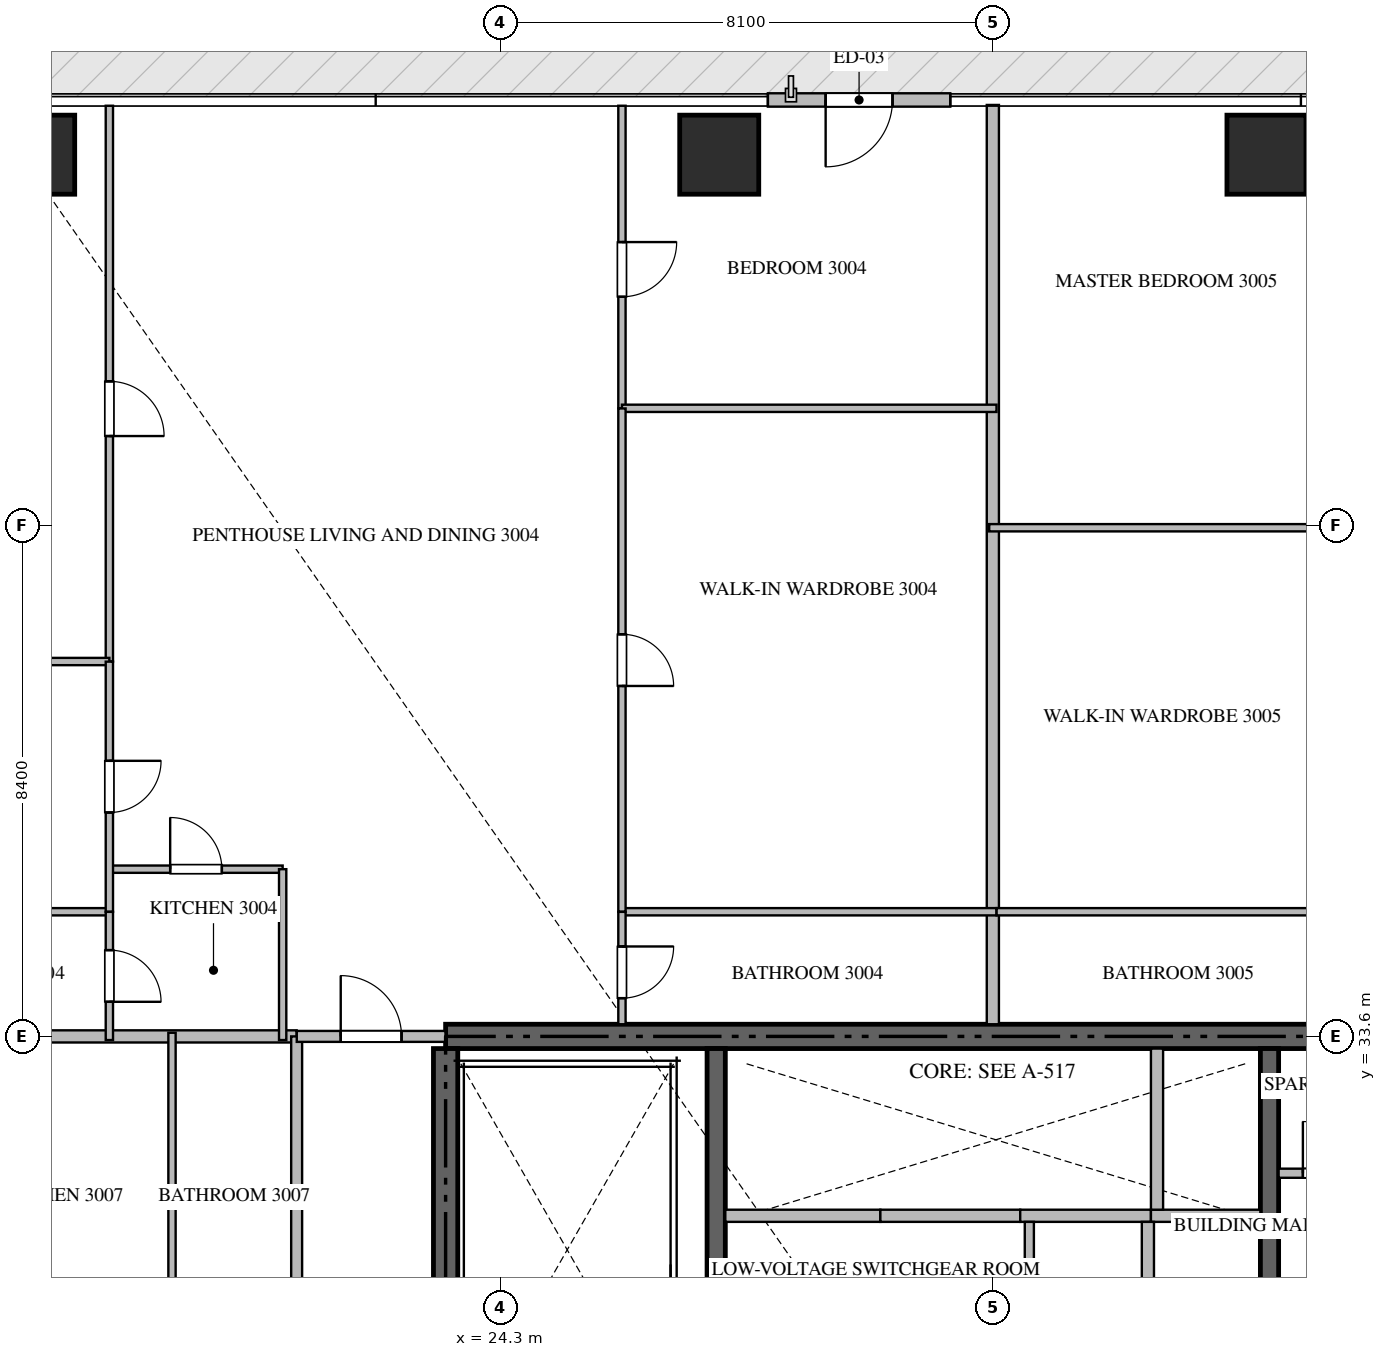
"""IFC4 building model, lengths in metres.
Left out: names, types, materials, properties, quantities, classifications, styles, units other than length and angle.
Written with IfcOpenShell. Run it as: python <this file> out.ifc"""

import sys

from ifc_helpers import new_model, si_unit, direction, frame, frame_2d, origin, origin_2d, place, context, subcontext, project, spatial, rectangle, extrude, source, transform, mapped, element, fill, save


model = new_model("IFC4")
c1 = context("Model", 3, precision=1e-05, world=origin(), true_north=direction((0.0, 1.0)))
c2 = subcontext(c1, "Body", "Model", "MODEL_VIEW")
j1 = project(units=[si_unit("LENGTHUNIT", "METRE"), si_unit("PLANEANGLEUNIT", "RADIAN")], contexts=[c1])
p1 = place(None, origin())
s1 = spatial("IfcSite", under=j1, at=p1, CompositionType="ELEMENT")
p2 = place(p1, origin())
s2 = spatial("IfcBuilding", under=s1, at=p2, CompositionType="ELEMENT")
p3 = place(p2, frame((0.0, 0.0, 123.9)))
s3 = spatial("IfcBuildingStorey", under=s2, at=p3, CompositionType="ELEMENT", Elevation=123.9)
p4 = place(p3, frame((41.4, 33.6, -0.26), z_axis=(0.0, 0.0, 1.0), x_axis=(-1.0, 0.0, 0.0)))
e1 = element("IfcWall", 1, at=p4, inside=s3, PredefinedType="SHEAR", context=c2, shape_type="SweptSolid", body=[
    extrude(rectangle(XDim=18.0, YDim=0.4, at=frame_2d((9.0, 0.0))), origin(), (0.0, 0.0, 1.0), 3.748),
])
p5 = place(p3, frame((23.4, 24.25, -0.26), z_axis=(0.0, 0.0, 1.0), x_axis=(0.0, 1.0, 0.0)))
e2 = element("IfcWall", 2, at=p5, inside=s3, PredefinedType="SHEAR", context=c2, shape_type="SweptSolid", body=[
    extrude(rectangle(XDim=9.15, YDim=0.4, at=frame_2d((4.575, 0.0))), origin(), (0.0, 0.0, 1.0), 3.748),
])
p6 = place(p3, frame((27.85, 23.55, -0.26), z_axis=(0.0, 0.0, 1.0), x_axis=(0.0, 1.0, 0.0)))
e3 = element("IfcWall", 3, at=p6, inside=s3, PredefinedType="SHEAR", context=c2, shape_type="SweptSolid", body=[
    extrude(rectangle(XDim=9.85, YDim=0.3, at=frame_2d((4.925, 0.0))), origin(), (0.0, 0.0, 1.0), 3.748),
])
p7 = place(p3, frame((36.95, 27.05, -0.26), z_axis=(0.0, 0.0, 1.0), x_axis=(0.0, 1.0, 0.0)))
e4 = element("IfcWall", 4, at=p7, inside=s3, PredefinedType="SHEAR", context=c2, shape_type="SweptSolid", body=[
    extrude(rectangle(XDim=6.35, YDim=0.3, at=frame_2d((3.175, 0.0))), origin(), (0.0, 0.0, 1.0), 3.748),
])
m1 = source(origin(), c2, "Body", "SweptSolid", [
    extrude(rectangle(XDim=1.3, YDim=1.3, at=origin_2d()), origin(), (0.0, 0.0, 1.0), 3.75),
])
for number, where, z_axis, x_axis in (
    (5, (16.65, 48.1, -0.26), (0.0, 0.0, 1.0), (1.0, 0.0, 0.0)),
    (6, (27.9, 48.1, -0.26), (0.0, 0.0, 1.0), (1.0, 0.0, 0.0)),
    (7, (36.9, 48.1, -0.26), (0.0, 0.0, 1.0), (1.0, 0.0, 0.0)),
):
    element("IfcColumn", number, at=place(p3, frame(where, z_axis=z_axis, x_axis=x_axis)), inside=s3, PredefinedType="COLUMN", context=c2, shape_type="MappedRepresentation", body=[
        mapped(m1, transform((0.0, 0.0, 0.0), scale=1.0)),
    ])
p8 = place(p3, frame((31.7, 49.0, 0.0), z_axis=(0.0, 0.0, 1.0), x_axis=(-1.0, 0.0, 0.0)))
e8 = element("IfcWall", 8, at=p8, inside=s3, PredefinedType="ELEMENTEDWALL", context=c2, shape_type="SweptSolid", body=[
    extrude(rectangle(XDim=3.0, YDim=0.22, at=frame_2d((1.5, 0.0))), origin(), (0.0, 0.0, 1.0), 3.475),
])
p9 = place(p8, frame((0.95, 0.0, 0.0)))
e9 = element("IfcOpeningElement", 9, at=p9, cuts=e8, PredefinedType="OPENING", context=c2, shape_type="SweptSolid", body=[
    extrude(rectangle(XDim=1.1, YDim=2.2, at=frame_2d((0.55, 1.1))), frame((0.0, 0.12, 0.0), z_axis=(0.0, -1.0, 0.0), x_axis=(1.0, 0.0, 0.0)), (0.0, 0.0, 1.0), 0.24),
])
p10 = place(p3, frame((28.0, 30.65, 0.0), z_axis=(0.0, 0.0, 1.0), x_axis=(1.0, 0.0, 0.0)))
e10 = element("IfcWall", 10, at=p10, inside=s3, PredefinedType="STANDARD", context=c2, shape_type="SweptSolid", body=[
    extrude(rectangle(XDim=2.55, YDim=0.2, at=frame_2d((1.275, 0.0))), origin(), (0.0, 0.0, 1.0), 3.49),
])
p11 = place(p3, frame((30.55, 30.65, 0.0), z_axis=(0.0, 0.0, 1.0), x_axis=(1.0, 0.0, 0.0)))
e11 = element("IfcWall", 11, at=p11, inside=s3, PredefinedType="STANDARD", context=c2, shape_type="SweptSolid", body=[
    extrude(rectangle(XDim=2.3, YDim=0.2, at=frame_2d((1.15, 0.0))), origin(), (0.0, 0.0, 1.0), 3.49),
])
p12 = place(p3, frame((32.85, 30.65, 0.0), z_axis=(0.0, 0.0, 1.0), x_axis=(1.0, 0.0, 0.0)))
e12 = element("IfcWall", 12, at=p12, inside=s3, PredefinedType="STANDARD", context=c2, shape_type="SweptSolid", body=[
    extrude(rectangle(XDim=2.15, YDim=0.2, at=frame_2d((1.075, 0.0))), origin(), (0.0, 0.0, 1.0), 3.49),
])
p13 = place(p3, frame((35.0, 30.65, 0.0), z_axis=(0.0, 0.0, 1.0), x_axis=(1.0, 0.0, 0.0)))
e13 = element("IfcWall", 13, at=p13, inside=s3, PredefinedType="STANDARD", context=c2, shape_type="SweptSolid", body=[
    extrude(rectangle(XDim=1.8, YDim=0.2, at=frame_2d((0.9, 0.0))), origin(), (0.0, 0.0, 1.0), 3.49),
])
p14 = place(p3, frame((35.1, 30.75, 0.0), z_axis=(0.0, 0.0, 1.0), x_axis=(0.0, 1.0, 0.0)))
e14 = element("IfcWall", 14, at=p14, inside=s3, PredefinedType="STANDARD", context=c2, shape_type="SweptSolid", body=[
    extrude(rectangle(XDim=2.65, YDim=0.2, at=frame_2d((1.325, 0.0))), origin(), (0.0, 0.0, 1.0), 3.49),
])
p15 = place(p3, frame((37.1, 31.35, 0.0), z_axis=(0.0, 0.0, 1.0), x_axis=(1.0, 0.0, 0.0)))
e15 = element("IfcWall", 15, at=p15, inside=s3, PredefinedType="PARTITIONING", context=c2, shape_type="SweptSolid", body=[
    extrude(rectangle(XDim=1.648, YDim=0.15, at=frame_2d((0.824, 0.0))), origin(), (0.0, 0.0, 1.0), 3.49),
])
p16 = place(p15, frame((0.399, 0.0, 0.0)))
e16 = element("IfcOpeningElement", 16, at=p16, cuts=e15, PredefinedType="OPENING", context=c2, shape_type="SweptSolid", body=[
    extrude(rectangle(XDim=0.85, YDim=2.1, at=frame_2d((0.425, 1.05))), frame((0.0, 0.085, 0.0), z_axis=(0.0, -1.0, 0.0), x_axis=(1.0, 0.0, 0.0)), (0.0, 0.0, 1.0), 0.17),
])
p17 = place(p3, frame((34.95, 26.95, 0.0), z_axis=(0.0, 0.0, 1.0), x_axis=(0.0, 1.0, 0.0)))
e17 = element("IfcWall", 17, at=p17, inside=s3, PredefinedType="STANDARD", context=c2, shape_type="SweptSolid", body=[
    extrude(rectangle(XDim=3.6, YDim=0.2, at=frame_2d((1.8, 0.0))), origin(), (0.0, 0.0, 1.0), 3.49),
])
p18 = place(p17, frame((1.35, 0.0, 0.0)))
e18 = element("IfcOpeningElement", 18, at=p18, cuts=e17, PredefinedType="OPENING", context=c2, shape_type="SweptSolid", body=[
    extrude(rectangle(XDim=0.9, YDim=2.1, at=frame_2d((0.45, 1.05))), frame((0.0, 0.11, 0.0), z_axis=(0.0, -1.0, 0.0), x_axis=(1.0, 0.0, 0.0)), (0.0, 0.0, 1.0), 0.22),
])
p19 = place(p3, frame((33.0, 26.95, 0.0), z_axis=(0.0, 0.0, 1.0), x_axis=(0.0, 1.0, 0.0)))
e19 = element("IfcWall", 19, at=p19, inside=s3, PredefinedType="PARTITIONING", context=c2, shape_type="SweptSolid", body=[
    extrude(rectangle(XDim=3.6, YDim=0.15, at=frame_2d((1.8, 0.0))), origin(), (0.0, 0.0, 1.0), 3.49),
])
p20 = place(p19, frame((1.375, 0.0, 0.0)))
e20 = element("IfcOpeningElement", 20, at=p20, cuts=e19, PredefinedType="OPENING", context=c2, shape_type="SweptSolid", body=[
    extrude(rectangle(XDim=0.85, YDim=2.1, at=frame_2d((0.425, 1.05))), frame((0.0, 0.085, 0.0), z_axis=(0.0, -1.0, 0.0), x_axis=(1.0, 0.0, 0.0)), (0.0, 0.0, 1.0), 0.17),
])
p21 = place(p3, frame((32.4, 33.8, 0.0), z_axis=(0.0, 0.0, 1.0), x_axis=(0.0, 1.0, 0.0)))
e21 = element("IfcWall", 21, at=p21, inside=s3, PredefinedType="PARTITIONING", context=c2, shape_type="SweptSolid", body=[
    extrude(rectangle(XDim=15.118, YDim=0.2, at=frame_2d((7.559, 0.0))), origin(), (0.0, 0.0, 1.0), 3.49),
])
p22 = place(p3, frame((7.882, 33.6, 0.0), z_axis=(0.0, 0.0, 1.0), x_axis=(1.0, 0.0, 0.0)))
e22 = element("IfcWall", 22, at=p22, inside=s3, PredefinedType="PARTITIONING", context=c2, shape_type="SweptSolid", body=[
    extrude(rectangle(XDim=13.068, YDim=0.2, at=frame_2d((6.534, 0.0))), origin(), (0.0, 0.0, 1.0), 3.49),
])
p23 = place(p3, frame((20.95, 14.9, 0.0), z_axis=(0.0, 0.0, 1.0), x_axis=(0.0, 1.0, 0.0)))
e23 = element("IfcWall", 23, at=p23, inside=s3, PredefinedType="PARTITIONING", context=c2, shape_type="SweptSolid", body=[
    extrude(rectangle(XDim=18.7, YDim=0.18, at=frame_2d((9.35, 0.0))), origin(), (0.0, 0.0, 1.0), 3.49),
])
p24 = place(p23, frame((1.805, 0.0, 0.0)))
e24 = element("IfcOpeningElement", 24, at=p24, cuts=e23, PredefinedType="OPENING", context=c2, shape_type="SweptSolid", body=[
    extrude(rectangle(XDim=1.0, YDim=2.15, at=frame_2d((0.5, 1.075))), frame((0.0, 0.1, 0.0), z_axis=(0.0, -1.0, 0.0), x_axis=(1.0, 0.0, 0.0)), (0.0, 0.0, 1.0), 0.2),
])
p25 = place(p23, frame((10.602, 0.0, 0.0)))
e25 = element("IfcOpeningElement", 25, at=p25, cuts=e23, PredefinedType="OPENING", context=c2, shape_type="SweptSolid", body=[
    extrude(rectangle(XDim=1.0, YDim=2.15, at=frame_2d((0.5, 1.075))), frame((0.0, 0.1, 0.0), z_axis=(0.0, -1.0, 0.0), x_axis=(1.0, 0.0, 0.0)), (0.0, 0.0, 1.0), 0.2),
])
p26 = place(p3, frame((20.952, 33.6, 0.0), z_axis=(0.0, 0.0, 1.0), x_axis=(1.0, 0.0, 0.0)))
e26 = element("IfcWall", 26, at=p26, inside=s3, PredefinedType="PARTITIONING", context=c2, shape_type="SweptSolid", body=[
    extrude(rectangle(XDim=2.446, YDim=0.18, at=frame_2d((1.223, 0.0))), origin(), (0.0, 0.0, 1.0), 3.49),
])
p27 = place(p26, frame((0.723, 0.0, 0.0)))
e27 = element("IfcOpeningElement", 27, at=p27, cuts=e26, PredefinedType="OPENING", context=c2, shape_type="SweptSolid", body=[
    extrude(rectangle(XDim=1.0, YDim=2.15, at=frame_2d((0.5, 1.075))), frame((0.0, 0.1, 0.0), z_axis=(0.0, -1.0, 0.0), x_axis=(1.0, 0.0, 0.0)), (0.0, 0.0, 1.0), 0.2),
])
p28 = place(p3, frame((17.87, 36.35, 0.0), z_axis=(0.0, 0.0, 1.0), x_axis=(1.0, 0.0, 0.0)))
e28 = element("IfcWall", 28, at=p28, inside=s3, PredefinedType="PARTITIONING", context=c2, shape_type="SweptSolid", body=[
    extrude(rectangle(XDim=2.85, YDim=0.12, at=frame_2d((1.425, 0.0))), origin(), (0.0, 0.0, 1.0), 3.49),
])
p29 = place(p28, frame((1.0, 0.0, 0.0)))
e29 = element("IfcOpeningElement", 29, at=p29, cuts=e28, PredefinedType="OPENING", context=c2, shape_type="SweptSolid", body=[
    extrude(rectangle(XDim=0.85, YDim=2.1, at=frame_2d((0.425, 1.05))), frame((0.0, 0.07, 0.0), z_axis=(0.0, -1.0, 0.0), x_axis=(1.0, 0.0, 0.0)), (0.0, 0.0, 1.0), 0.14),
])
p30 = place(p3, frame((20.72, 36.35, 0.0), z_axis=(0.0, 0.0, 1.0), x_axis=(0.0, -1.0, 0.0)))
e30 = element("IfcWall", 30, at=p30, inside=s3, PredefinedType="PARTITIONING", context=c2, shape_type="SweptSolid", body=[
    extrude(rectangle(XDim=2.81, YDim=0.12, at=frame_2d((1.405, 0.0))), origin(), (0.0, 0.0, 1.0), 3.49),
])
p31 = place(p3, frame((17.87, 48.905, 0.0), z_axis=(0.0, 0.0, 1.0), x_axis=(0.0, -1.0, 0.0)))
e31 = element("IfcWall", 31, at=p31, inside=s3, PredefinedType="PARTITIONING", context=c2, shape_type="SweptSolid", body=[
    extrude(rectangle(XDim=9.14, YDim=0.12, at=frame_2d((4.57, 0.0))), origin(), (0.0, 0.0, 1.0), 3.49),
])
p32 = place(p31, frame((4.532, 0.0, 0.0)))
e32 = element("IfcOpeningElement", 32, at=p32, cuts=e31, PredefinedType="OPENING", context=c2, shape_type="SweptSolid", body=[
    extrude(rectangle(XDim=0.9, YDim=2.1, at=frame_2d((0.45, 1.05))), frame((0.0, 0.07, 0.0), z_axis=(0.0, -1.0, 0.0), x_axis=(1.0, 0.0, 0.0)), (0.0, 0.0, 1.0), 0.14),
])
p33 = place(p3, frame((7.895, 39.765, 0.0), z_axis=(0.0, 0.0, 1.0), x_axis=(1.0, 0.0, 0.0)))
e33 = element("IfcWall", 33, at=p33, inside=s3, PredefinedType="PARTITIONING", context=c2, shape_type="SweptSolid", body=[
    extrude(rectangle(XDim=9.975, YDim=0.12, at=frame_2d((4.988, 0.0))), origin(), (0.0, 0.0, 1.0), 3.49),
])
p34 = place(p3, frame((14.67, 35.65, 0.0), z_axis=(0.0, 0.0, 1.0), x_axis=(1.0, 0.0, 0.0)))
e34 = element("IfcWall", 34, at=p34, inside=s3, PredefinedType="PARTITIONING", context=c2, shape_type="SweptSolid", body=[
    extrude(rectangle(XDim=3.2, YDim=0.12, at=frame_2d((1.6, 0.0))), origin(), (0.0, 0.0, 1.0), 3.49),
])
p35 = place(p3, frame((17.87, 39.763, 0.0), z_axis=(0.0, 0.0, 1.0), x_axis=(0.0, -1.0, 0.0)))
e35 = element("IfcWall", 35, at=p35, inside=s3, PredefinedType="PARTITIONING", context=c2, shape_type="SweptSolid", body=[
    extrude(rectangle(XDim=4.113, YDim=0.12, at=frame_2d((2.057, 0.0))), origin(), (0.0, 0.0, 1.0), 3.49),
])
p36 = place(p35, frame((1.631, 0.0, 0.0)))
e36 = element("IfcOpeningElement", 36, at=p36, cuts=e35, PredefinedType="OPENING", context=c2, shape_type="SweptSolid", body=[
    extrude(rectangle(XDim=0.85, YDim=2.1, at=frame_2d((0.425, 1.05))), frame((0.0, 0.07, 0.0), z_axis=(0.0, -1.0, 0.0), x_axis=(1.0, 0.0, 0.0)), (0.0, 0.0, 1.0), 0.14),
])
p37 = place(p3, frame((17.87, 35.648, 0.0), z_axis=(0.0, 0.0, 1.0), x_axis=(0.0, -1.0, 0.0)))
e37 = element("IfcWall", 37, at=p37, inside=s3, PredefinedType="PARTITIONING", context=c2, shape_type="SweptSolid", body=[
    extrude(rectangle(XDim=2.108, YDim=0.12, at=frame_2d((1.054, 0.0))), origin(), (0.0, 0.0, 1.0), 3.49),
])
p38 = place(p37, frame((0.629, 0.0, 0.0)))
e38 = element("IfcOpeningElement", 38, at=p38, cuts=e37, PredefinedType="OPENING", context=c2, shape_type="SweptSolid", body=[
    extrude(rectangle(XDim=0.85, YDim=2.1, at=frame_2d((0.425, 1.05))), frame((0.0, 0.07, 0.0), z_axis=(0.0, -1.0, 0.0), x_axis=(1.0, 0.0, 0.0)), (0.0, 0.0, 1.0), 0.14),
])
p39 = place(p3, frame((26.3, 48.905, 0.0), z_axis=(0.0, 0.0, 1.0), x_axis=(0.0, -1.0, 0.0)))
e39 = element("IfcWall", 39, at=p39, inside=s3, PredefinedType="PARTITIONING", context=c2, shape_type="SweptSolid", body=[
    extrude(rectangle(XDim=4.976, YDim=0.12, at=frame_2d((2.488, 0.0))), origin(), (0.0, 0.0, 1.0), 3.49),
])
p40 = place(p39, frame((2.242, 0.0, 0.0)))
e40 = element("IfcOpeningElement", 40, at=p40, cuts=e39, PredefinedType="OPENING", context=c2, shape_type="SweptSolid", body=[
    extrude(rectangle(XDim=0.9, YDim=2.1, at=frame_2d((0.45, 1.05))), frame((0.0, 0.07, 0.0), z_axis=(0.0, -1.0, 0.0), x_axis=(1.0, 0.0, 0.0)), (0.0, 0.0, 1.0), 0.14),
])
for number, where, z_axis, x_axis in (
    (41, (26.3, 43.929, 0.0), (0.0, 0.0, 1.0), (1.0, 0.0, 0.0)),
    (42, (26.3, 35.65, 0.0), (0.0, 0.0, 1.0), (1.0, 0.0, 0.0)),
):
    element("IfcWall", number, at=place(p3, frame(where, z_axis=z_axis, x_axis=x_axis)), inside=s3, PredefinedType="PARTITIONING", context=c2, shape_type="SweptSolid", body=[
        extrude(rectangle(XDim=6.16, YDim=0.12, at=frame_2d((3.08, 0.0))), origin(), (0.0, 0.0, 1.0), 3.49),
    ])
p41 = place(p3, frame((26.3, 43.927, 0.0), z_axis=(0.0, 0.0, 1.0), x_axis=(0.0, -1.0, 0.0)))
e43 = element("IfcWall", 43, at=p41, inside=s3, PredefinedType="PARTITIONING", context=c2, shape_type="SweptSolid", body=[
    extrude(rectangle(XDim=8.277, YDim=0.12, at=frame_2d((4.139, 0.0))), origin(), (0.0, 0.0, 1.0), 3.49),
])
p42 = place(p41, frame((3.714, 0.0, 0.0)))
e44 = element("IfcOpeningElement", 44, at=p42, cuts=e43, PredefinedType="OPENING", context=c2, shape_type="SweptSolid", body=[
    extrude(rectangle(XDim=0.85, YDim=2.1, at=frame_2d((0.425, 1.05))), frame((0.0, 0.07, 0.0), z_axis=(0.0, -1.0, 0.0), x_axis=(1.0, 0.0, 0.0)), (0.0, 0.0, 1.0), 0.14),
])
p43 = place(p3, frame((26.3, 35.648, 0.0), z_axis=(0.0, 0.0, 1.0), x_axis=(0.0, -1.0, 0.0)))
e45 = element("IfcWall", 45, at=p43, inside=s3, PredefinedType="PARTITIONING", context=c2, shape_type="SweptSolid", body=[
    extrude(rectangle(XDim=1.848, YDim=0.12, at=frame_2d((0.924, 0.0))), origin(), (0.0, 0.0, 1.0), 3.49),
])
p44 = place(p43, frame((0.569, 0.0, 0.0)))
e46 = element("IfcOpeningElement", 46, at=p44, cuts=e45, PredefinedType="OPENING", context=c2, shape_type="SweptSolid", body=[
    extrude(rectangle(XDim=0.85, YDim=2.1, at=frame_2d((0.425, 1.05))), frame((0.0, 0.07, 0.0), z_axis=(0.0, -1.0, 0.0), x_axis=(1.0, 0.0, 0.0)), (0.0, 0.0, 1.0), 0.14),
])
p45 = place(p3, frame((32.34, 41.965, 0.0), z_axis=(0.0, 0.0, 1.0), x_axis=(1.0, 0.0, 0.0)))
e47 = element("IfcWall", 47, at=p45, inside=s3, PredefinedType="PARTITIONING", context=c2, shape_type="SweptSolid", body=[
    extrude(rectangle(XDim=6.16, YDim=0.12, at=frame_2d((3.08, 0.0))), origin(), (0.0, 0.0, 1.0), 3.49),
])
p46 = place(p3, frame((32.462, 35.65, 0.0), z_axis=(0.0, 0.0, 1.0), x_axis=(1.0, 0.0, 0.0)))
e48 = element("IfcWall", 48, at=p46, inside=s3, PredefinedType="PARTITIONING", context=c2, shape_type="SweptSolid", body=[
    extrude(rectangle(XDim=6.038, YDim=0.12, at=frame_2d((3.019, 0.0))), origin(), (0.0, 0.0, 1.0), 3.49),
])
p47 = place(p3, frame((18.9, 27.8, 0.0), z_axis=(0.0, 0.0, 1.0), x_axis=(0.0, 1.0, 0.0)))
e49 = element("IfcWall", 49, at=p47, inside=s3, PredefinedType="PARTITIONING", context=c2, shape_type="SweptSolid", body=[
    extrude(rectangle(XDim=5.86, YDim=0.12, at=frame_2d((2.93, 0.0))), origin(), (0.0, 0.0, 1.0), 3.49),
])
m2 = source(origin(), c2, "Body", "SweptSolid", [
    extrude(rectangle(XDim=1.1, YDim=2.2, at=frame_2d((0.55, 1.1))), frame((0.0, 0.025, 0.0), z_axis=(0.0, -1.0, 0.0), x_axis=(1.0, 0.0, 0.0)), (0.0, 0.0, 1.0), 0.05),
])
p48 = place(p9, origin())
e50 = element("IfcDoor", 50, at=p48, inside=s3, OperationType="SINGLE_SWING_RIGHT", PredefinedType="DOOR", context=c2, shape_type="MappedRepresentation", body=[
    mapped(m2, transform((0.0, 0.0, 0.0), scale=1.0)),
])
fill(e9, e50)
m3 = source(origin(), c2, "Body", "SweptSolid", [
    extrude(rectangle(XDim=0.85, YDim=2.1, at=frame_2d((0.425, 1.05))), frame((0.0, 0.025, 0.0), z_axis=(0.0, -1.0, 0.0), x_axis=(1.0, 0.0, 0.0)), (0.0, 0.0, 1.0), 0.05),
])
p49 = place(p16, origin())
e51 = element("IfcDoor", 51, at=p49, inside=s3, OperationType="SINGLE_SWING_LEFT", PredefinedType="DOOR", context=c2, shape_type="MappedRepresentation", body=[
    mapped(m3, transform((0.0, 0.0, 0.0), scale=1.0)),
])
fill(e16, e51)
m4 = source(origin(), c2, "Body", "SweptSolid", [
    extrude(rectangle(XDim=1.0, YDim=2.15, at=frame_2d((0.5, 1.075))), frame((0.0, 0.025, 0.0), z_axis=(0.0, -1.0, 0.0), x_axis=(1.0, 0.0, 0.0)), (0.0, 0.0, 1.0), 0.05),
])
p50 = place(p27, origin())
e52 = element("IfcDoor", 52, at=p50, inside=s3, OperationType="SINGLE_SWING_LEFT", PredefinedType="DOOR", context=c2, shape_type="MappedRepresentation", body=[
    mapped(m4, transform((0.0, 0.0, 0.0), scale=1.0)),
])
fill(e27, e52)
p51 = place(p29, origin())
e53 = element("IfcDoor", 53, at=p51, inside=s3, OperationType="SINGLE_SWING_LEFT", PredefinedType="DOOR", context=c2, shape_type="MappedRepresentation", body=[
    mapped(m3, transform((0.0, 0.0, 0.0), scale=1.0)),
])
fill(e29, e53)
m5 = source(origin(), c2, "Body", "SweptSolid", [
    extrude(rectangle(XDim=0.9, YDim=2.1, at=frame_2d((0.45, 1.05))), frame((0.0, 0.025, 0.0), z_axis=(0.0, -1.0, 0.0), x_axis=(1.0, 0.0, 0.0)), (0.0, 0.0, 1.0), 0.05),
])
p52 = place(p32, origin())
e54 = element("IfcDoor", 54, at=p52, inside=s3, OperationType="SINGLE_SWING_RIGHT", PredefinedType="DOOR", context=c2, shape_type="MappedRepresentation", body=[
    mapped(m5, transform((0.0, 0.0, 0.0), scale=1.0)),
])
fill(e32, e54)
p53 = place(p36, origin())
e55 = element("IfcDoor", 55, at=p53, inside=s3, OperationType="SINGLE_SWING_LEFT", PredefinedType="DOOR", context=c2, shape_type="MappedRepresentation", body=[
    mapped(m3, transform((0.0, 0.0, 0.0), scale=1.0)),
])
fill(e36, e55)
p54 = place(p38, origin())
e56 = element("IfcDoor", 56, at=p54, inside=s3, OperationType="SINGLE_SWING_RIGHT", PredefinedType="DOOR", context=c2, shape_type="MappedRepresentation", body=[
    mapped(m3, transform((0.0, 0.0, 0.0), scale=1.0)),
])
fill(e38, e56)
p55 = place(p40, origin())
e57 = element("IfcDoor", 57, at=p55, inside=s3, OperationType="SINGLE_SWING_LEFT", PredefinedType="DOOR", context=c2, shape_type="MappedRepresentation", body=[
    mapped(m5, transform((0.0, 0.0, 0.0), scale=1.0)),
])
fill(e40, e57)
p56 = place(p42, origin())
e58 = element("IfcDoor", 58, at=p56, inside=s3, OperationType="SINGLE_SWING_RIGHT", PredefinedType="DOOR", context=c2, shape_type="MappedRepresentation", body=[
    mapped(m3, transform((0.0, 0.0, 0.0), scale=1.0)),
])
fill(e44, e58)
p57 = place(p44, origin())
e59 = element("IfcDoor", 59, at=p57, inside=s3, OperationType="SINGLE_SWING_LEFT", PredefinedType="DOOR", context=c2, shape_type="MappedRepresentation", body=[
    mapped(m3, transform((0.0, 0.0, 0.0), scale=1.0)),
])
fill(e46, e59)
save(model, sys.argv[1])
